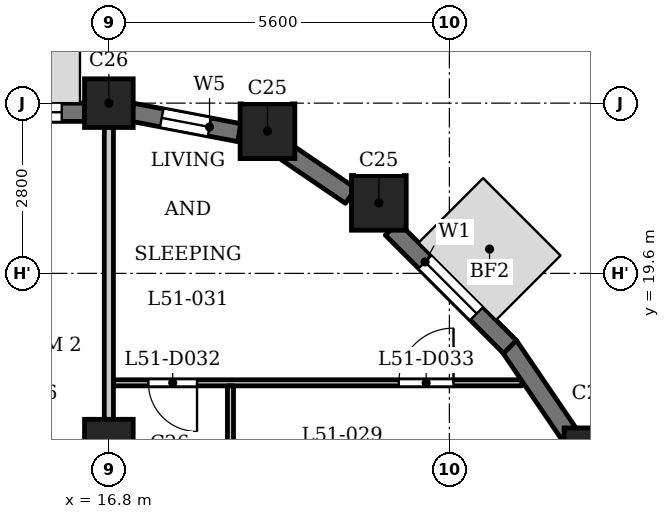
"""IFC4 building model, lengths in metres.
Left out: names, types, materials, properties, quantities, classifications, styles, units other than length and angle.
Written with IfcOpenShell. Run it as: python <this file> out.ifc"""

import sys

from ifc_helpers import new_model, si_unit, direction, frame, frame_2d, origin, origin_2d, place, context, subcontext, project, spatial, rectangle, extrude, element, fill, save


model = new_model("IFC4")
c1 = context("Model", 3, precision=1e-05, world=origin(), true_north=direction((0.0, 1.0)))
c2 = subcontext(c1, "Body", "Model", "MODEL_VIEW")
j1 = project(units=[si_unit("LENGTHUNIT", "METRE"), si_unit("PLANEANGLEUNIT", "RADIAN")], contexts=[c1])
p1 = place(None, origin())
s1 = spatial("IfcSite", under=j1, at=p1, CompositionType="ELEMENT")
p2 = place(p1, origin())
s2 = spatial("IfcBuilding", under=s1, at=p2, CompositionType="ELEMENT")
p3 = place(p2, frame((0.0, 0.0, 199.4)))
s3 = spatial("IfcBuildingStorey", under=s2, at=p3, CompositionType="ELEMENT", Elevation=199.4)
for number, where, z_axis, x_axis in (
    (1, (24.738, 16.609, 0.0), (0.0, 0.0, 1.0), (1.0, 0.0, 0.0)),
    (2, (21.24, 20.76, 0.0), (0.0, 0.0, 1.0), (1.0, 0.0, 0.0)),
    (3, (19.409, 21.938, 0.0), (0.0, 0.0, 1.0), (1.0, 0.0, 0.0)),
):
    element("IfcColumn", number, at=place(p3, frame(where, z_axis=z_axis, x_axis=x_axis)), inside=s3, PredefinedType="COLUMN", context=c2, shape_type="SweptSolid", body=[
        extrude(rectangle(XDim=0.9, YDim=0.9, at=origin_2d()), origin(), (0.0, 0.0, 1.0), 3.5),
    ])
for number, where, z_axis, x_axis in (
    (4, (16.8, 16.8, 0.0), (0.0, 0.0, 1.0), (1.0, 0.0, 0.0)),
    (5, (16.8, 22.4, 0.0), (0.0, 0.0, 1.0), (1.0, 0.0, 0.0)),
):
    element("IfcColumn", number, at=place(p3, frame(where, z_axis=z_axis, x_axis=x_axis)), inside=s3, PredefinedType="COLUMN", context=c2, shape_type="SweptSolid", body=[
        extrude(rectangle(XDim=0.8, YDim=0.8, at=origin_2d()), origin(), (0.0, 0.0, 1.0), 3.5),
    ])
p4 = place(p3, frame((24.394, 16.919, 0.0), z_axis=(0.0, 0.0, 1.0), x_axis=(-0.562040093569, 0.827109988588, 0.0)))
e6 = element("IfcWall", 6, at=p4, inside=s3, PredefinedType="SOLIDWALL", context=c2, shape_type="SweptSolid", body=[
    extrude(rectangle(XDim=1.806, YDim=0.3, at=frame_2d((0.903, 0.0))), origin(), (0.0, 0.0, 1.0), 2.5),
])
p5 = place(p3, frame((23.397, 18.391, 0.0), z_axis=(0.0, 0.0, 1.0), x_axis=(-0.707106781187, 0.707106781187, 0.0)))
e7 = element("IfcWall", 7, at=p5, inside=s3, PredefinedType="SOLIDWALL", context=c2, shape_type="SweptSolid", body=[
    extrude(rectangle(XDim=2.75, YDim=0.3, at=frame_2d((1.375, 0.0))), origin(), (0.0, 0.0, 1.0), 2.5),
])
p6 = place(p5, frame((0.775, 0.0, 0.6)))
e8 = element("IfcOpeningElement", 8, at=p6, cuts=e7, PredefinedType="OPENING", context=c2, shape_type="SweptSolid", body=[
    extrude(rectangle(XDim=1.2, YDim=1.55, at=frame_2d((0.6, 0.775))), frame((0.0, 0.16, 0.0), z_axis=(0.0, -1.0, 0.0), x_axis=(1.0, 0.0, 0.0)), (0.0, 0.0, 1.0), 0.32),
])
p7 = place(p3, frame((20.775, 20.876, 0.0), z_axis=(0.0, 0.0, 1.0), x_axis=(-0.827075824828, 0.562090366388, 0.0)))
e9 = element("IfcWall", 9, at=p7, inside=s3, PredefinedType="SOLIDWALL", context=c2, shape_type="SweptSolid", body=[
    extrude(rectangle(XDim=1.277, YDim=0.3, at=frame_2d((0.638, 0.0))), origin(), (0.0, 0.0, 1.0), 2.5),
])
p8 = place(p3, frame((18.946, 21.914, 0.0), z_axis=(0.0, 0.0, 1.0), x_axis=(-0.98230529033, 0.187286722942, 0.0)))
e10 = element("IfcWall", 10, at=p8, inside=s3, PredefinedType="SOLIDWALL", context=c2, shape_type="SweptSolid", body=[
    extrude(rectangle(XDim=1.799, YDim=0.3, at=frame_2d((0.899, 0.0))), origin(), (0.0, 0.0, 1.0), 2.5),
])
p9 = place(p8, frame((0.5, 0.0, 0.6)))
e11 = element("IfcOpeningElement", 11, at=p9, cuts=e10, PredefinedType="OPENING", context=c2, shape_type="SweptSolid", body=[
    extrude(rectangle(XDim=0.8, YDim=1.55, at=frame_2d((0.4, 0.775))), frame((0.0, 0.16, 0.0), z_axis=(0.0, -1.0, 0.0), x_axis=(1.0, 0.0, 0.0)), (0.0, 0.0, 1.0), 0.32),
])
p10 = place(p3, frame((16.4, 22.25, 0.0), z_axis=(0.0, 0.0, 1.0), x_axis=(-1.0, 0.0, 0.0)))
e12 = element("IfcWall", 12, at=p10, inside=s3, PredefinedType="SOLIDWALL", context=c2, shape_type="SweptSolid", body=[
    extrude(rectangle(XDim=1.95, YDim=0.3, at=frame_2d((0.975, 0.0))), origin(), (0.0, 0.0, 1.0), 2.5),
])
p11 = place(p10, frame((0.375, 0.0, 0.6)))
e13 = element("IfcOpeningElement", 13, at=p11, cuts=e12, PredefinedType="OPENING", context=c2, shape_type="SweptSolid", body=[
    extrude(rectangle(XDim=1.2, YDim=1.55, at=frame_2d((0.6, 0.775))), frame((0.0, 0.16, 0.0), z_axis=(0.0, -1.0, 0.0), x_axis=(1.0, 0.0, 0.0)), (0.0, 0.0, 1.0), 0.32),
])
p12 = place(p3, frame((16.875, 17.8, 0.0), z_axis=(0.0, 0.0, 1.0), x_axis=(1.0, 0.0, 0.0)))
e14 = element("IfcWall", 14, at=p12, inside=s3, PredefinedType="PARTITIONING", context=c2, shape_type="SweptSolid", body=[
    extrude(rectangle(XDim=6.719, YDim=0.1, at=frame_2d((3.359, 0.0))), origin(), (0.0, 0.0, 1.0), 3.2),
])
p13 = place(p12, frame((0.575, 0.0, 0.0)))
e15 = element("IfcOpeningElement", 15, at=p13, cuts=e14, PredefinedType="OPENING", context=c2, shape_type="SweptSolid", body=[
    extrude(rectangle(XDim=0.8, YDim=2.1, at=frame_2d((0.4, 1.05))), frame((0.0, 0.06, 0.0), z_axis=(0.0, -1.0, 0.0), x_axis=(1.0, 0.0, 0.0)), (0.0, 0.0, 1.0), 0.12),
])
p14 = place(p12, frame((4.693, 0.0, 0.0)))
e16 = element("IfcOpeningElement", 16, at=p14, cuts=e14, PredefinedType="OPENING", context=c2, shape_type="SweptSolid", body=[
    extrude(rectangle(XDim=0.9, YDim=2.1, at=frame_2d((0.45, 1.05))), frame((0.0, 0.06, 0.0), z_axis=(0.0, -1.0, 0.0), x_axis=(1.0, 0.0, 0.0)), (0.0, 0.0, 1.0), 0.12),
])
p15 = place(p3, frame((16.8, 15.475, 0.0), z_axis=(0.0, 0.0, 1.0), x_axis=(0.0, 1.0, 0.0)))
e17 = element("IfcWall", 17, at=p15, inside=s3, PredefinedType="PARTITIONING", context=c2, shape_type="SweptSolid", body=[
    extrude(rectangle(XDim=6.835, YDim=0.15, at=frame_2d((3.417, 0.0))), origin(), (0.0, 0.0, 1.0), 2.55),
])
p16 = place(p3, frame((18.8, 15.475, 0.0), z_axis=(0.0, 0.0, 1.0), x_axis=(0.0, 1.0, 0.0)))
e18 = element("IfcWall", 18, at=p16, inside=s3, PredefinedType="PARTITIONING", context=c2, shape_type="SweptSolid", body=[
    extrude(rectangle(XDim=2.275, YDim=0.1, at=frame_2d((1.137, 0.0))), origin(), (0.0, 0.0, 1.0), 3.2),
])
p17 = place(p13, origin())
e19 = element("IfcDoor", 19, at=p17, inside=s3, OperationType="SINGLE_SWING_RIGHT", PredefinedType="DOOR", context=c2, shape_type="SweptSolid", body=[
    extrude(rectangle(XDim=0.8, YDim=2.1, at=frame_2d((0.4, 1.05))), frame((0.0, 0.025, 0.0), z_axis=(0.0, -1.0, 0.0), x_axis=(1.0, 0.0, 0.0)), (0.0, 0.0, 1.0), 0.05),
])
fill(e15, e19)
p18 = place(p14, origin())
e20 = element("IfcDoor", 20, at=p18, inside=s3, OperationType="SINGLE_SWING_LEFT", PredefinedType="DOOR", context=c2, shape_type="SweptSolid", body=[
    extrude(rectangle(XDim=0.9, YDim=2.1, at=frame_2d((0.45, 1.05))), frame((0.0, 0.025, 0.0), z_axis=(0.0, -1.0, 0.0), x_axis=(1.0, 0.0, 0.0)), (0.0, 0.0, 1.0), 0.05),
])
fill(e16, e20)
p19 = place(p6, origin())
e21 = element("IfcWindow", 21, at=p19, inside=s3, PartitioningType="SINGLE_PANEL", PredefinedType="WINDOW", context=c2, shape_type="SweptSolid", body=[
    extrude(rectangle(XDim=1.2, YDim=1.55, at=frame_2d((0.6, 0.775))), frame((0.0, 0.03, 0.0), z_axis=(0.0, -1.0, 0.0), x_axis=(1.0, 0.0, 0.0)), (0.0, 0.0, 1.0), 0.06),
])
fill(e8, e21)
p20 = place(p9, origin())
e22 = element("IfcWindow", 22, at=p20, inside=s3, PartitioningType="SINGLE_PANEL", PredefinedType="WINDOW", context=c2, shape_type="SweptSolid", body=[
    extrude(rectangle(XDim=0.8, YDim=1.55, at=frame_2d((0.4, 0.775))), frame((0.0, 0.03, 0.0), z_axis=(0.0, -1.0, 0.0), x_axis=(1.0, 0.0, 0.0)), (0.0, 0.0, 1.0), 0.06),
])
fill(e11, e22)
p21 = place(p11, origin())
e23 = element("IfcWindow", 23, at=p21, inside=s3, PartitioningType="SINGLE_PANEL", PredefinedType="WINDOW", context=c2, shape_type="SweptSolid", body=[
    extrude(rectangle(XDim=1.2, YDim=1.55, at=frame_2d((0.6, 0.775))), frame((0.0, 0.03, 0.0), z_axis=(0.0, -1.0, 0.0), x_axis=(1.0, 0.0, 0.0)), (0.0, 0.0, 1.0), 0.06),
])
fill(e13, e23)
save(model, sys.argv[1])
